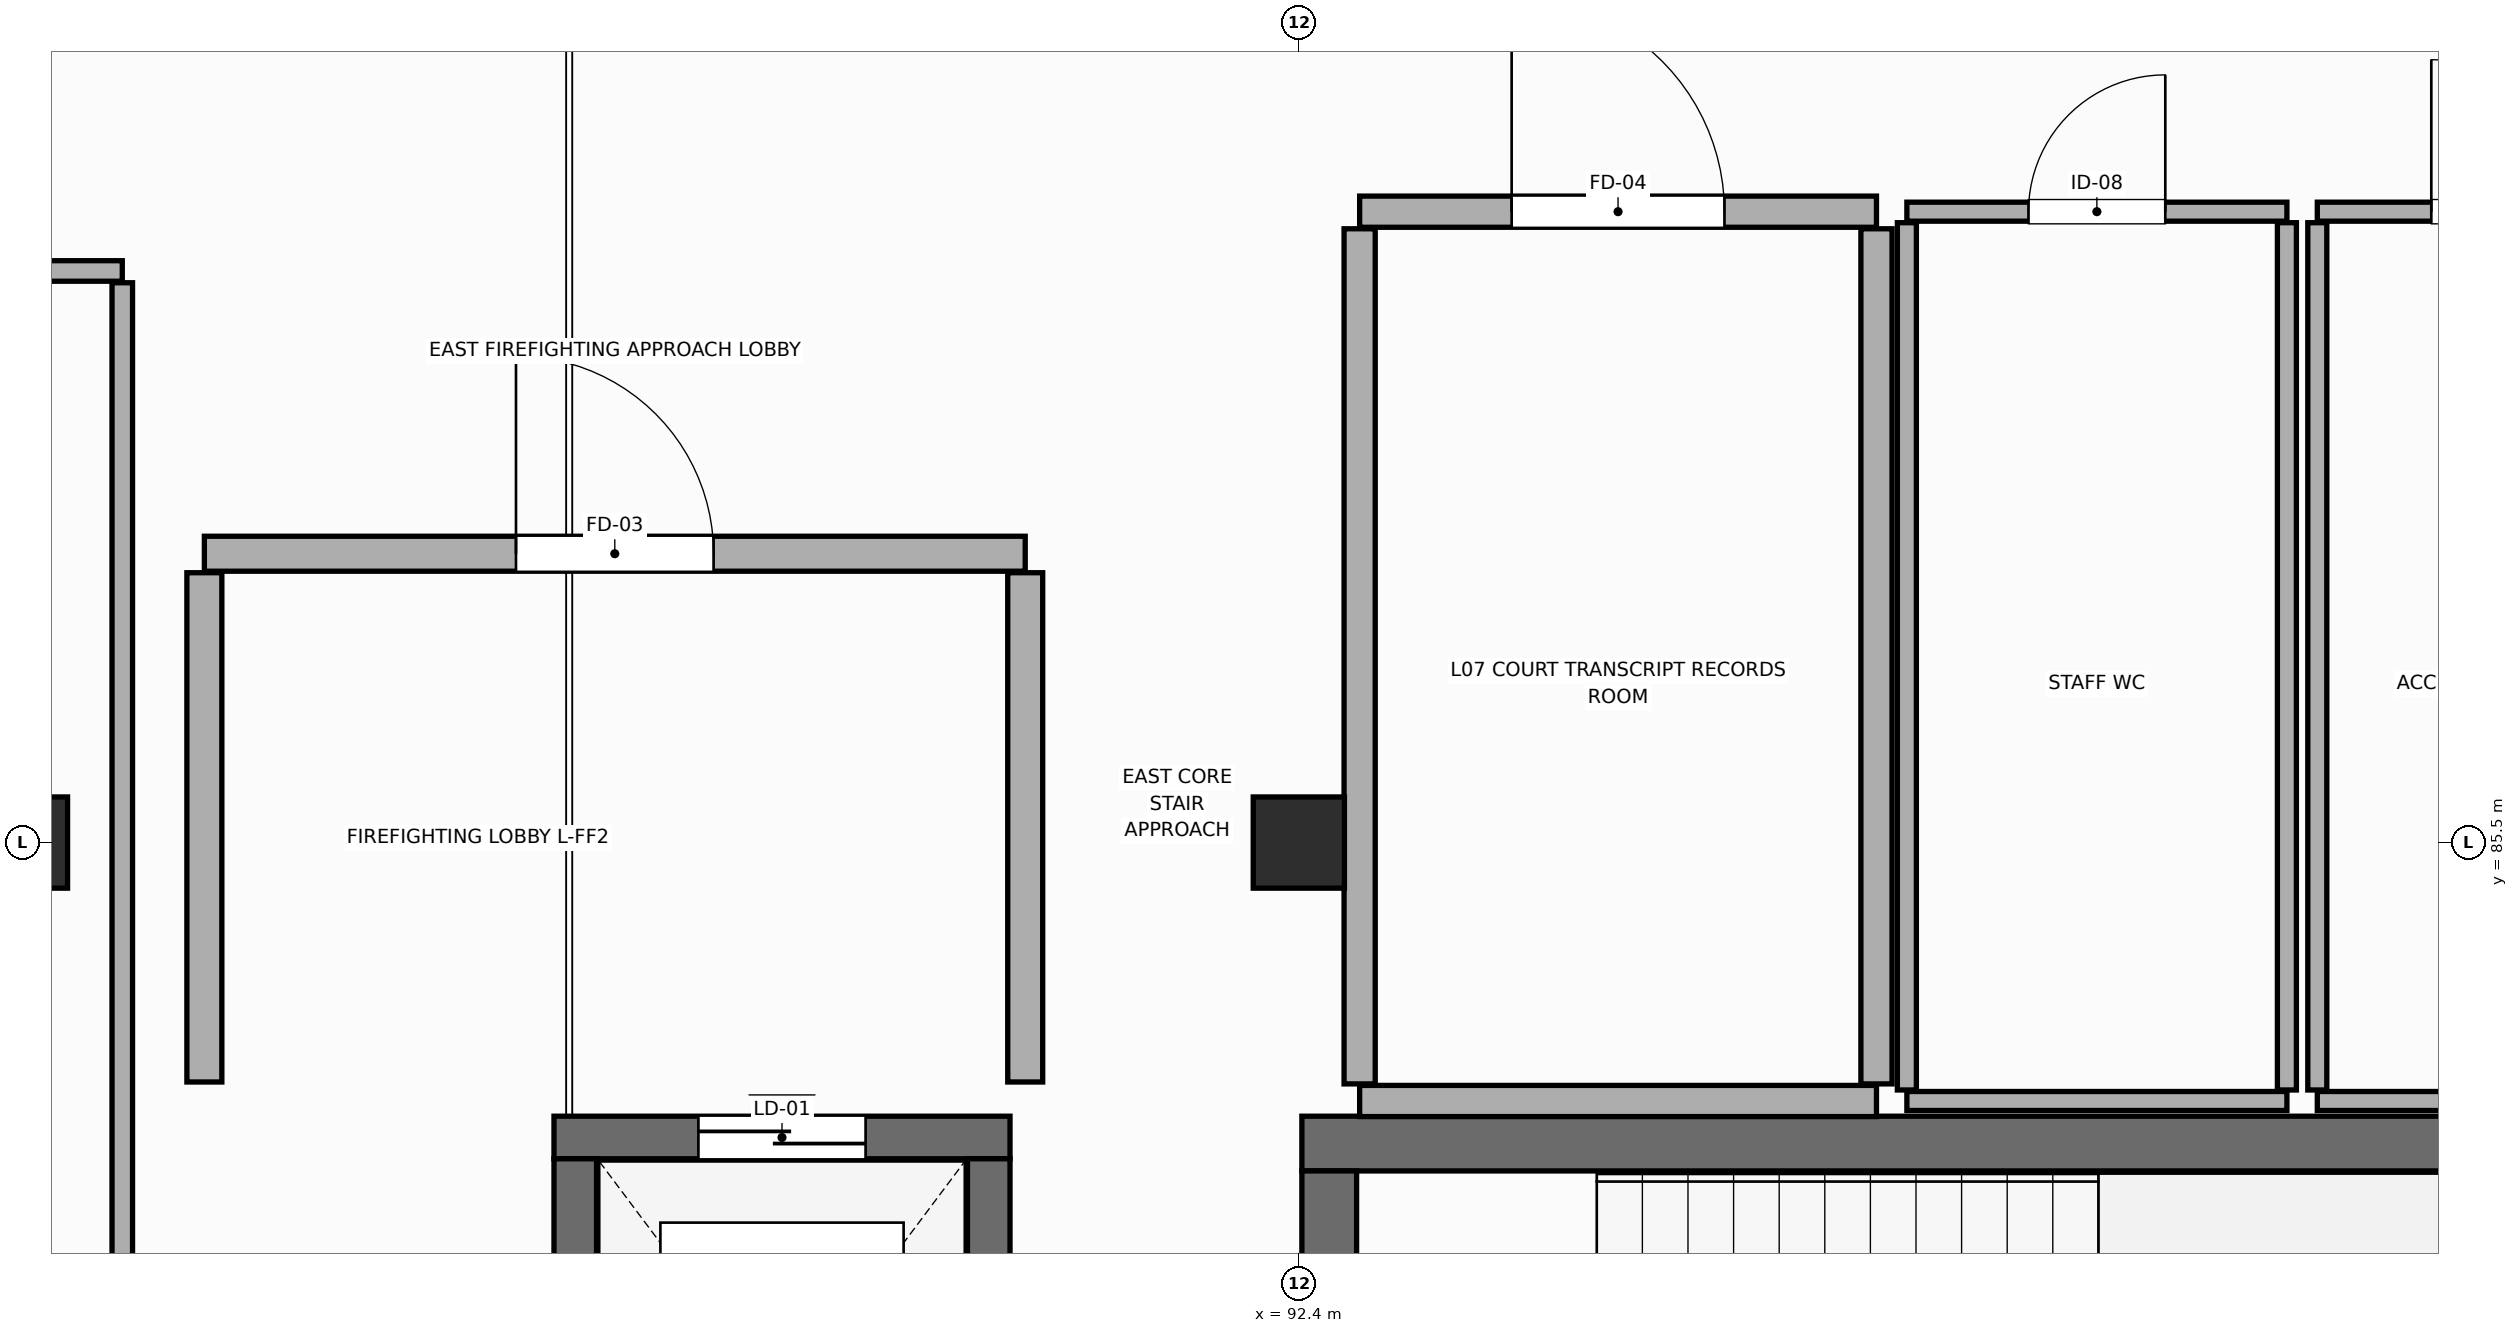
"""IFC4 building model, lengths in metres.
Left out: names, types, materials, properties, quantities, classifications, styles, units other than length and angle.
Written with IfcOpenShell. Run it as: python <this file> out.ifc"""

import sys

from ifc_helpers import new_model, si_unit, direction, frame, frame_2d, origin, origin_2d, place, context, subcontext, project, spatial, rectangle, extrude, element, fill, save


model = new_model("IFC4")
c1 = context("Model", 3, precision=1e-05, world=origin(), true_north=direction((0.0, 1.0)))
c2 = subcontext(c1, "Body", "Model", "MODEL_VIEW")
j1 = project(units=[si_unit("LENGTHUNIT", "METRE"), si_unit("PLANEANGLEUNIT", "RADIAN")], contexts=[c1])
p1 = place(None, origin())
s1 = spatial("IfcSite", under=j1, at=p1, CompositionType="ELEMENT")
p2 = place(p1, origin())
s2 = spatial("IfcBuilding", under=s1, at=p2, CompositionType="ELEMENT")
p3 = place(p2, frame((0.0, 0.0, 27.0)))
s3 = spatial("IfcBuildingStorey", under=s2, at=p3, CompositionType="ELEMENT", Elevation=27.0)
for number, where, z_axis, x_axis in (
    (1, (84.0, 85.5, 0.0), (0.0, 0.0, 1.0), (1.0, 0.0, 0.0)),
    (2, (92.4, 85.5, 0.0), (0.0, 0.0, 1.0), (1.0, 0.0, 0.0)),
):
    element("IfcColumn", number, at=place(p3, frame(where, z_axis=z_axis, x_axis=x_axis)), inside=s3, PredefinedType="COLUMN", context=c2, shape_type="SweptSolid", body=[
        extrude(rectangle(XDim=0.6, YDim=0.6, at=origin_2d()), origin(), (0.0, 0.0, 1.0), 4.2),
    ])
p4 = place(p3, frame((92.42, 83.52, 0.0), z_axis=(0.0, 0.0, 1.0), x_axis=(1.0, 0.0, 0.0)))
e3 = element("IfcWall", 3, at=p4, inside=s3, PredefinedType="SHEAR", context=c2, shape_type="SweptSolid", body=[
    extrude(rectangle(XDim=9.36, YDim=0.36, at=frame_2d((4.68, 0.0))), origin(), (0.0, 0.0, 1.0), 3.98),
])
p5 = place(p3, frame((92.6, 79.98, 0.0), z_axis=(0.0, 0.0, 1.0), x_axis=(0.0, 1.0, 0.0)))
e4 = element("IfcWall", 4, at=p5, inside=s3, PredefinedType="SHEAR", context=c2, shape_type="SweptSolid", body=[
    extrude(rectangle(XDim=3.36, YDim=0.36, at=frame_2d((1.68, 0.0))), origin(), (0.0, 0.0, 1.0), 3.98),
])
p6 = place(p5, frame((1.08, 0.0, 0.0)))
e5 = element("IfcOpeningElement", 5, at=p6, cuts=e4, PredefinedType="OPENING", context=c2, shape_type="SweptSolid", body=[
    extrude(rectangle(XDim=1.2, YDim=2.2, at=frame_2d((0.6, 1.1))), frame((0.0, 0.19, 0.0), z_axis=(0.0, -1.0, 0.0), x_axis=(1.0, 0.0, 0.0)), (0.0, 0.0, 1.0), 0.38),
])
p7 = place(p3, frame((87.5, 83.56, 0.0), z_axis=(0.0, 0.0, 1.0), x_axis=(1.0, 0.0, 0.0)))
e6 = element("IfcWall", 6, at=p7, inside=s3, PredefinedType="SHEAR", context=c2, shape_type="SweptSolid", body=[
    extrude(rectangle(XDim=3.0, YDim=0.28, at=frame_2d((1.5, 0.0))), origin(), (0.0, 0.0, 1.0), 3.98),
])
p8 = place(p7, frame((0.95, 0.0, 0.0)))
e7 = element("IfcOpeningElement", 7, at=p8, cuts=e6, PredefinedType="OPENING", context=c2, shape_type="SweptSolid", body=[
    extrude(rectangle(XDim=1.1, YDim=2.2, at=frame_2d((0.55, 1.1))), frame((0.0, 0.15, 0.0), z_axis=(0.0, -1.0, 0.0), x_axis=(1.0, 0.0, 0.0)), (0.0, 0.0, 1.0), 0.3),
])
for number, where, z_axis, x_axis in (
    (8, (87.64, 80.18, 0.0), (0.0, 0.0, 1.0), (0.0, 1.0, 0.0)),
    (9, (90.36, 83.42, 0.0), (0.0, 0.0, 1.0), (0.0, -1.0, 0.0)),
):
    element("IfcWall", number, at=place(p3, frame(where, z_axis=z_axis, x_axis=x_axis)), inside=s3, PredefinedType="SHEAR", context=c2, shape_type="SweptSolid", body=[
        extrude(rectangle(XDim=3.24, YDim=0.28, at=frame_2d((1.62, 0.0))), origin(), (0.0, 0.0, 1.0), 3.98),
    ])
p9 = place(p3, frame((85.2, 87.4, 0.0), z_axis=(0.0, 0.0, 1.0), x_axis=(1.0, 0.0, 0.0)))
e10 = element("IfcWall", 10, at=p9, inside=s3, PredefinedType="STANDARD", context=c2, shape_type="SweptSolid", body=[
    extrude(rectangle(XDim=5.4, YDim=0.23, at=frame_2d((2.7, 0.0))), origin(), (0.0, 0.0, 1.0), 3.965),
])
p10 = place(p9, frame((2.05, 0.0, 0.0)))
e11 = element("IfcOpeningElement", 11, at=p10, cuts=e10, PredefinedType="OPENING", context=c2, shape_type="SweptSolid", body=[
    extrude(rectangle(XDim=1.3, YDim=2.2, at=frame_2d((0.65, 1.1))), frame((0.0, 0.125, 0.0), z_axis=(0.0, -1.0, 0.0), x_axis=(1.0, 0.0, 0.0)), (0.0, 0.0, 1.0), 0.25),
])
for number, where, z_axis, x_axis in (
    (12, (85.2, 83.925, 0.0), (0.0, 0.0, 1.0), (0.0, 1.0, 0.0)),
    (13, (90.6, 87.275, 0.0), (0.0, 0.0, 1.0), (0.0, -1.0, 0.0)),
):
    element("IfcWall", number, at=place(p3, frame(where, z_axis=z_axis, x_axis=x_axis)), inside=s3, PredefinedType="STANDARD", context=c2, shape_type="SweptSolid", body=[
        extrude(rectangle(XDim=3.35, YDim=0.23, at=frame_2d((1.675, 0.0))), origin(), (0.0, 0.0, 1.0), 3.41),
    ])
p11 = place(p3, frame((96.4, 89.65, 0.0), z_axis=(0.0, 0.0, 1.0), x_axis=(1.0, 0.0, 0.0)))
e14 = element("IfcWall", 14, at=p11, inside=s3, PredefinedType="PARTITIONING", context=c2, shape_type="SweptSolid", body=[
    extrude(rectangle(XDim=2.5, YDim=0.125, at=frame_2d((1.25, 0.0))), origin(), (0.0, 0.0, 1.0), 3.965),
])
p12 = place(p11, frame((0.8, 0.0, 0.0)))
e15 = element("IfcOpeningElement", 15, at=p12, cuts=e14, PredefinedType="OPENING", context=c2, shape_type="SweptSolid", body=[
    extrude(rectangle(XDim=0.9, YDim=2.1, at=frame_2d((0.45, 1.05))), frame((0.0, 0.073, 0.0), z_axis=(0.0, -1.0, 0.0), x_axis=(1.0, 0.0, 0.0)), (0.0, 0.0, 1.0), 0.145),
])
p13 = place(p3, frame((98.9, 83.8, 0.0), z_axis=(0.0, 0.0, 1.0), x_axis=(-1.0, 0.0, 0.0)))
e16 = element("IfcWall", 16, at=p13, inside=s3, PredefinedType="PARTITIONING", context=c2, shape_type="SweptSolid", body=[
    extrude(rectangle(XDim=2.5, YDim=0.125, at=frame_2d((1.25, 0.0))), origin(), (0.0, 0.0, 1.0), 3.965),
])
for number, where, z_axis, x_axis in (
    (17, (96.4, 83.873, 0.0), (0.0, 0.0, 1.0), (0.0, 1.0, 0.0)),
    (18, (98.9, 89.577, 0.0), (0.0, 0.0, 1.0), (0.0, -1.0, 0.0)),
):
    element("IfcWall", number, at=place(p3, frame(where, z_axis=z_axis, x_axis=x_axis)), inside=s3, PredefinedType="PARTITIONING", context=c2, shape_type="SweptSolid", body=[
        extrude(rectangle(XDim=5.705, YDim=0.125, at=frame_2d((2.853, 0.0))), origin(), (0.0, 0.0, 1.0), 3.965),
    ])
p14 = place(p3, frame((99.1, 89.65, 0.0), z_axis=(0.0, 0.0, 1.0), x_axis=(1.0, 0.0, 0.0)))
e19 = element("IfcWall", 19, at=p14, inside=s3, PredefinedType="PARTITIONING", context=c2, shape_type="SweptSolid", body=[
    extrude(rectangle(XDim=2.5, YDim=0.125, at=frame_2d((1.25, 0.0))), origin(), (0.0, 0.0, 1.0), 3.11),
])
p15 = place(p14, frame((0.75, 0.0, 0.0)))
e20 = element("IfcOpeningElement", 20, at=p15, cuts=e19, PredefinedType="OPENING", context=c2, shape_type="SweptSolid", body=[
    extrude(rectangle(XDim=1.0, YDim=2.1, at=frame_2d((0.5, 1.05))), frame((0.0, 0.073, 0.0), z_axis=(0.0, -1.0, 0.0), x_axis=(1.0, 0.0, 0.0)), (0.0, 0.0, 1.0), 0.145),
])
p16 = place(p3, frame((101.6, 83.8, 0.0), z_axis=(0.0, 0.0, 1.0), x_axis=(-1.0, 0.0, 0.0)))
e21 = element("IfcWall", 21, at=p16, inside=s3, PredefinedType="PARTITIONING", context=c2, shape_type="SweptSolid", body=[
    extrude(rectangle(XDim=2.5, YDim=0.125, at=frame_2d((1.25, 0.0))), origin(), (0.0, 0.0, 1.0), 3.11),
])
p17 = place(p3, frame((99.1, 83.873, 0.0), z_axis=(0.0, 0.0, 1.0), x_axis=(0.0, 1.0, 0.0)))
e22 = element("IfcWall", 22, at=p17, inside=s3, PredefinedType="PARTITIONING", context=c2, shape_type="SweptSolid", body=[
    extrude(rectangle(XDim=5.705, YDim=0.125, at=frame_2d((2.853, 0.0))), origin(), (0.0, 0.0, 1.0), 3.965),
])
p18 = place(p3, frame((92.8, 89.65, 0.0), z_axis=(0.0, 0.0, 1.0), x_axis=(1.0, 0.0, 0.0)))
e23 = element("IfcWall", 23, at=p18, inside=s3, PredefinedType="STANDARD", context=c2, shape_type="SweptSolid", body=[
    extrude(rectangle(XDim=3.4, YDim=0.205, at=frame_2d((1.7, 0.0))), origin(), (0.0, 0.0, 1.0), 3.965),
])
p19 = place(p18, frame((1.0, 0.0, 0.0)))
e24 = element("IfcOpeningElement", 24, at=p19, cuts=e23, PredefinedType="OPENING", context=c2, shape_type="SweptSolid", body=[
    extrude(rectangle(XDim=1.4, YDim=2.25, at=frame_2d((0.7, 1.125))), frame((0.0, 0.113, 0.0), z_axis=(0.0, -1.0, 0.0), x_axis=(1.0, 0.0, 0.0)), (0.0, 0.0, 1.0), 0.225),
])
p20 = place(p3, frame((96.2, 83.8, 0.0), z_axis=(0.0, 0.0, 1.0), x_axis=(-1.0, 0.0, 0.0)))
e25 = element("IfcWall", 25, at=p20, inside=s3, PredefinedType="STANDARD", context=c2, shape_type="SweptSolid", body=[
    extrude(rectangle(XDim=3.4, YDim=0.205, at=frame_2d((1.7, 0.0))), origin(), (0.0, 0.0, 1.0), 3.965),
])
for number, where, z_axis, x_axis in (
    (26, (92.8, 83.913, 0.0), (0.0, 0.0, 1.0), (0.0, 1.0, 0.0)),
    (27, (96.2, 89.538, 0.0), (0.0, 0.0, 1.0), (0.0, -1.0, 0.0)),
):
    element("IfcWall", number, at=place(p3, frame(where, z_axis=z_axis, x_axis=x_axis)), inside=s3, PredefinedType="STANDARD", context=c2, shape_type="SweptSolid", body=[
        extrude(rectangle(XDim=5.625, YDim=0.205, at=frame_2d((2.812, 0.0))), origin(), (0.0, 0.0, 1.0), 3.965),
    ])
p21 = place(p3, frame((82.273, 89.26, 0.0), z_axis=(0.0, 0.0, 1.0), x_axis=(1.0, 0.0, 0.0)))
e28 = element("IfcWall", 28, at=p21, inside=s3, PredefinedType="PARTITIONING", context=c2, shape_type="SweptSolid", body=[
    extrude(rectangle(XDim=2.387, YDim=0.135, at=frame_2d((1.193, 0.0))), origin(), (0.0, 0.0, 1.0), 3.51),
])
p22 = place(p21, frame((0.719, 0.0, 0.0)))
e29 = element("IfcOpeningElement", 29, at=p22, cuts=e28, PredefinedType="OPENING", context=c2, shape_type="SweptSolid", body=[
    extrude(rectangle(XDim=0.95, YDim=2.15, at=frame_2d((0.475, 1.075))), frame((0.0, 0.077, 0.0), z_axis=(0.0, -1.0, 0.0), x_axis=(1.0, 0.0, 0.0)), (0.0, 0.0, 1.0), 0.155),
])
p23 = place(p3, frame((84.66, 89.183, 0.0), z_axis=(0.0, 0.0, 1.0), x_axis=(0.0, -1.0, 0.0)))
e30 = element("IfcWall", 30, at=p23, inside=s3, PredefinedType="PARTITIONING", context=c2, shape_type="SweptSolid", body=[
    extrude(rectangle(XDim=9.579, YDim=0.135, at=frame_2d((4.789, 0.0))), origin(), (0.0, 0.0, 1.0), 3.41),
])
p24 = place(p8, origin())
e31 = element("IfcDoor", 31, at=p24, inside=s3, OperationType="DOUBLE_DOOR_SLIDING", PredefinedType="DOOR", context=c2, shape_type="SweptSolid", body=[
    extrude(rectangle(XDim=1.1, YDim=2.2, at=frame_2d((0.55, 1.1))), frame((0.0, 0.025, 0.0), z_axis=(0.0, -1.0, 0.0), x_axis=(1.0, 0.0, 0.0)), (0.0, 0.0, 1.0), 0.05),
])
fill(e7, e31)
p25 = place(p10, origin())
e32 = element("IfcDoor", 32, at=p25, inside=s3, OperationType="SINGLE_SWING_LEFT", PredefinedType="DOOR", context=c2, shape_type="SweptSolid", body=[
    extrude(rectangle(XDim=1.3, YDim=2.2, at=frame_2d((0.65, 1.1))), frame((0.0, 0.025, 0.0), z_axis=(0.0, -1.0, 0.0), x_axis=(1.0, 0.0, 0.0)), (0.0, 0.0, 1.0), 0.05),
])
fill(e11, e32)
p26 = place(p12, origin())
e33 = element("IfcDoor", 33, at=p26, inside=s3, OperationType="SINGLE_SWING_RIGHT", PredefinedType="DOOR", context=c2, shape_type="SweptSolid", body=[
    extrude(rectangle(XDim=0.9, YDim=2.1, at=frame_2d((0.45, 1.05))), frame((0.0, 0.025, 0.0), z_axis=(0.0, -1.0, 0.0), x_axis=(1.0, 0.0, 0.0)), (0.0, 0.0, 1.0), 0.05),
])
fill(e15, e33)
p27 = place(p15, origin())
e34 = element("IfcDoor", 34, at=p27, inside=s3, OperationType="SINGLE_SWING_LEFT", PredefinedType="DOOR", context=c2, shape_type="SweptSolid", body=[
    extrude(rectangle(XDim=1.0, YDim=2.1, at=frame_2d((0.5, 1.05))), frame((0.0, 0.025, 0.0), z_axis=(0.0, -1.0, 0.0), x_axis=(1.0, 0.0, 0.0)), (0.0, 0.0, 1.0), 0.05),
])
fill(e20, e34)
p28 = place(p19, origin())
e35 = element("IfcDoor", 35, at=p28, inside=s3, OperationType="SINGLE_SWING_LEFT", PredefinedType="DOOR", context=c2, shape_type="SweptSolid", body=[
    extrude(rectangle(XDim=1.4, YDim=2.25, at=frame_2d((0.7, 1.125))), frame((0.0, 0.025, 0.0), z_axis=(0.0, -1.0, 0.0), x_axis=(1.0, 0.0, 0.0)), (0.0, 0.0, 1.0), 0.05),
])
fill(e24, e35)
save(model, sys.argv[1])
